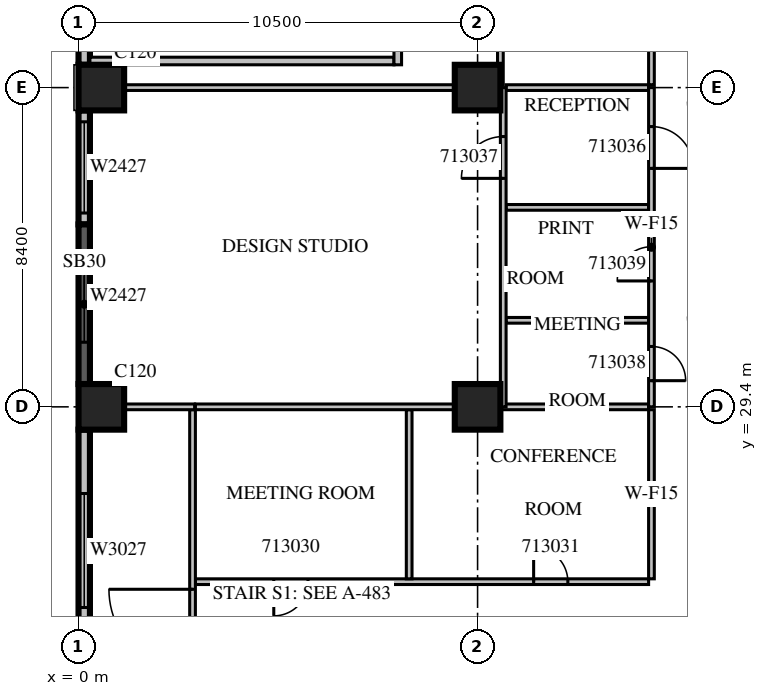
"""IFC4 building model, lengths in metres.
Left out: names, types, materials, properties, quantities, classifications, styles, units other than length and angle.
Written with IfcOpenShell. Run it as: python <this file> out.ifc"""

import sys

from ifc_helpers import new_model, si_unit, direction, frame, frame_2d, origin, origin_2d, place, context, subcontext, project, spatial, rectangle, extrude, source, transform, mapped, element, fill, save


model = new_model("IFC4")
c1 = context("Model", 3, precision=1e-05, world=origin(), true_north=direction((0.0, 1.0)))
c2 = subcontext(c1, "Body", "Model", "MODEL_VIEW")
j1 = project(units=[si_unit("LENGTHUNIT", "METRE"), si_unit("PLANEANGLEUNIT", "RADIAN")], contexts=[c1])
p1 = place(None, origin())
s1 = spatial("IfcSite", under=j1, at=p1, CompositionType="ELEMENT")
p2 = place(p1, origin())
s2 = spatial("IfcBuilding", under=s1, at=p2, CompositionType="ELEMENT")
p3 = place(p2, frame((0.0, 0.0, 65.7)))
s3 = spatial("IfcBuildingStorey", under=s2, at=p3, CompositionType="ELEMENT", Elevation=65.7)
m1 = source(origin(), c2, "Body", "SweptSolid", [
    extrude(rectangle(XDim=1.2, YDim=1.2, at=origin_2d()), origin(), (0.0, 0.0, 1.0), 4.2),
])
for number, where, z_axis, x_axis in (
    (1, (0.6, 29.4, 0.0), (0.0, 0.0, 1.0), (1.0, 0.0, 0.0)),
    (2, (10.5, 29.4, 0.0), (0.0, 0.0, 1.0), (1.0, 0.0, 0.0)),
    (3, (0.6, 37.8, 0.0), (0.0, 0.0, 1.0), (1.0, 0.0, 0.0)),
    (4, (10.5, 37.8, 0.0), (0.0, 0.0, 1.0), (1.0, 0.0, 0.0)),
):
    element("IfcColumn", number, at=place(p3, frame(where, z_axis=z_axis, x_axis=x_axis)), inside=s3, PredefinedType="COLUMN", context=c2, shape_type="MappedRepresentation", body=[
        mapped(m1, transform((0.0, 0.0, 0.0), scale=1.0)),
    ])
m2 = source(origin(), c2, "Body", "SweptSolid", [
    extrude(rectangle(XDim=1.8, YDim=0.3, at=frame_2d((0.9, 0.0))), origin(), (0.0, 0.0, 1.0), 3.8),
])
p4 = place(p3, frame((0.15, 40.2, 0.0), z_axis=(0.0, 0.0, 1.0), x_axis=(0.0, -1.0, 0.0)))
e5 = element("IfcWall", 5, at=p4, inside=s3, PredefinedType="STANDARD", context=c2, shape_type="MappedRepresentation", body=[
    mapped(m2, transform((0.0, 0.0, 0.0), scale=1.0)),
])
m3 = source(origin(), c2, "Body", "SweptSolid", [
    extrude(rectangle(XDim=3.0, YDim=0.3, at=frame_2d((1.5, 0.0))), origin(), (0.0, 0.0, 1.0), 3.8),
])
p5 = place(p3, frame((0.15, 37.2, 0.0), z_axis=(0.0, 0.0, 1.0), x_axis=(0.0, -1.0, 0.0)))
e6 = element("IfcWall", 6, at=p5, inside=s3, PredefinedType="STANDARD", context=c2, shape_type="MappedRepresentation", body=[
    mapped(m3, transform((0.0, 0.0, 0.0), scale=1.0)),
])
m4 = source(origin(), c2, "Body", "SweptSolid", [
    extrude(rectangle(XDim=2.4, YDim=2.7, at=frame_2d((1.2, 1.35))), frame((0.0, 0.16, 0.0), z_axis=(0.0, -1.0, 0.0), x_axis=(1.0, 0.0, 0.0)), (0.0, 0.0, 1.0), 0.32),
])
p6 = place(p5, frame((0.3, 0.0, 0.6)))
e7 = element("IfcOpeningElement", 7, at=p6, cuts=e6, PredefinedType="OPENING", context=c2, shape_type="MappedRepresentation", body=[
    mapped(m4, transform((0.0, 0.0, 0.0), scale=1.0)),
])
m5 = source(origin(), c2, "Body", "SweptSolid", [
    extrude(rectangle(XDim=4.2, YDim=0.3, at=frame_2d((2.1, 0.0))), origin(), (0.0, 0.0, 1.0), 3.8),
])
p7 = place(p3, frame((0.15, 34.2, 0.0), z_axis=(0.0, 0.0, 1.0), x_axis=(0.0, -1.0, 0.0)))
e8 = element("IfcWall", 8, at=p7, inside=s3, PredefinedType="SOLIDWALL", context=c2, shape_type="MappedRepresentation", body=[
    mapped(m5, transform((0.0, 0.0, 0.0), scale=1.0)),
])
p8 = place(p7, frame((0.7, 0.0, 0.6)))
e9 = element("IfcOpeningElement", 9, at=p8, cuts=e8, PredefinedType="OPENING", context=c2, shape_type="MappedRepresentation", body=[
    mapped(m4, transform((0.0, 0.0, 0.0), scale=1.0)),
])
m6 = source(origin(), c2, "Body", "SweptSolid", [
    extrude(rectangle(XDim=7.2, YDim=0.3, at=frame_2d((3.6, 0.0))), origin(), (0.0, 0.0, 1.0), 3.8),
])
p9 = place(p3, frame((0.15, 28.8, 0.0), z_axis=(0.0, 0.0, 1.0), x_axis=(0.0, -1.0, 0.0)))
e10 = element("IfcWall", 10, at=p9, inside=s3, PredefinedType="STANDARD", context=c2, shape_type="MappedRepresentation", body=[
    mapped(m6, transform((0.0, 0.0, 0.0), scale=1.0)),
])
m7 = source(origin(), c2, "Body", "SweptSolid", [
    extrude(rectangle(XDim=3.0, YDim=2.7, at=frame_2d((1.5, 1.35))), frame((0.0, 0.16, 0.0), z_axis=(0.0, -1.0, 0.0), x_axis=(1.0, 0.0, 0.0)), (0.0, 0.0, 1.0), 0.32),
])
p10 = place(p9, frame((1.68, 0.0, 0.6)))
e11 = element("IfcOpeningElement", 11, at=p10, cuts=e10, PredefinedType="OPENING", context=c2, shape_type="MappedRepresentation", body=[
    mapped(m7, transform((0.0, 0.0, 0.0), scale=1.0)),
])
m8 = source(origin(), c2, "Body", "SweptSolid", [
    extrude(rectangle(XDim=8.0, YDim=0.2, at=frame_2d((4.0, 0.0))), origin(), (0.0, 0.0, 1.0), 3.8),
])
p11 = place(p3, frame((0.3, 38.5, 0.0), z_axis=(0.0, 0.0, 1.0), x_axis=(1.0, 0.0, 0.0)))
e12 = element("IfcWall", 12, at=p11, inside=s3, PredefinedType="PARTITIONING", context=c2, shape_type="MappedRepresentation", body=[
    mapped(m8, transform((0.0, 0.0, 0.0), scale=1.0)),
])
m9 = source(origin(), c2, "Body", "SweptSolid", [
    extrude(rectangle(XDim=5.45, YDim=0.2, at=frame_2d((2.725, 0.0))), origin(), (0.0, 0.0, 1.0), 3.8),
])
p12 = place(p3, frame((8.4, 38.4, 0.0), z_axis=(0.0, 0.0, 1.0), x_axis=(0.0, 1.0, 0.0)))
e13 = element("IfcWall", 13, at=p12, inside=s3, PredefinedType="PARTITIONING", context=c2, shape_type="MappedRepresentation", body=[
    mapped(m9, transform((0.0, 0.0, 0.0), scale=1.0)),
])
m10 = source(origin(), c2, "Body", "SweptSolid", [
    extrude(rectangle(XDim=1.2, YDim=2.1, at=frame_2d((0.6, 1.05))), frame((0.0, 0.11, 0.0), z_axis=(0.0, -1.0, 0.0), x_axis=(1.0, 0.0, 0.0)), (0.0, 0.0, 1.0), 0.22),
])
p13 = place(p12, frame((0.4, 0.0, 0.0)))
e14 = element("IfcOpeningElement", 14, at=p13, cuts=e13, PredefinedType="OPENING", context=c2, shape_type="MappedRepresentation", body=[
    mapped(m10, transform((0.0, 0.0, 0.0), scale=1.0)),
])
m11 = source(origin(), c2, "Body", "SweptSolid", [
    extrude(rectangle(XDim=0.9, YDim=2.1, at=frame_2d((0.45, 1.05))), frame((0.0, 0.11, 0.0), z_axis=(0.0, -1.0, 0.0), x_axis=(1.0, 0.0, 0.0)), (0.0, 0.0, 1.0), 0.22),
])
p14 = place(p12, frame((3.25, 0.0, 0.0)))
e15 = element("IfcOpeningElement", 15, at=p14, cuts=e13, PredefinedType="OPENING", context=c2, shape_type="MappedRepresentation", body=[
    mapped(m11, transform((0.0, 0.0, 0.0), scale=1.0)),
])
m12 = source(origin(), c2, "Body", "SweptSolid", [
    extrude(rectangle(XDim=11.925, YDim=0.15, at=frame_2d((5.963, 0.0))), origin(), (0.0, 0.0, 1.0), 3.8),
])
p15 = place(p3, frame((3.075, 24.8, 0.0), z_axis=(0.0, 0.0, 1.0), x_axis=(1.0, 0.0, 0.0)))
e16 = element("IfcWall", 16, at=p15, inside=s3, PredefinedType="PARTITIONING", context=c2, shape_type="MappedRepresentation", body=[
    mapped(m12, transform((0.0, 0.0, 0.0), scale=1.0)),
])
m13 = source(origin(), c2, "Body", "SweptSolid", [
    extrude(rectangle(XDim=0.9, YDim=2.1, at=frame_2d((0.45, 1.05))), frame((0.0, 0.085, 0.0), z_axis=(0.0, -1.0, 0.0), x_axis=(1.0, 0.0, 0.0)), (0.0, 0.0, 1.0), 0.17),
])
p16 = place(p15, frame((2.062, 0.0, 0.0)))
e17 = element("IfcOpeningElement", 17, at=p16, cuts=e16, PredefinedType="OPENING", context=c2, shape_type="MappedRepresentation", body=[
    mapped(m13, transform((0.0, 0.0, 0.0), scale=1.0)),
])
p17 = place(p15, frame((8.9, 0.0, 0.0)))
e18 = element("IfcOpeningElement", 18, at=p17, cuts=e16, PredefinedType="OPENING", context=c2, shape_type="MappedRepresentation", body=[
    mapped(m13, transform((0.0, 0.0, 0.0), scale=1.0)),
])
m14 = source(origin(), c2, "Body", "SweptSolid", [
    extrude(rectangle(XDim=4.45, YDim=0.15, at=frame_2d((2.225, 0.0))), origin(), (0.0, 0.0, 1.0), 3.8),
])
for number, where, z_axis, x_axis in (
    (19, (8.7, 24.875, 0.0), (0.0, 0.0, 1.0), (0.0, 1.0, 0.0)),
    (20, (15.075, 24.875, 0.0), (0.0, 0.0, 1.0), (0.0, 1.0, 0.0)),
):
    element("IfcWall", number, at=place(p3, frame(where, z_axis=z_axis, x_axis=x_axis)), inside=s3, PredefinedType="PARTITIONING", context=c2, shape_type="MappedRepresentation", body=[
        mapped(m14, transform((0.0, 0.0, 0.0), scale=1.0)),
    ])
m15 = source(origin(), c2, "Body", "SweptSolid", [
    extrude(rectangle(XDim=6.826, YDim=0.15, at=frame_2d((3.413, 0.0))), origin(), (0.0, 0.0, 1.0), 3.8),
])
p18 = place(p3, frame((9.901, 29.4, 0.0), z_axis=(0.0, 0.0, 1.0), x_axis=(-1.0, 0.0, 0.0)))
e21 = element("IfcWall", 21, at=p18, inside=s3, PredefinedType="PARTITIONING", context=c2, shape_type="MappedRepresentation", body=[
    mapped(m15, transform((0.0, 0.0, 0.0), scale=1.0)),
])
m16 = source(origin(), c2, "Body", "SweptSolid", [
    extrude(rectangle(XDim=3.901, YDim=0.15, at=frame_2d((1.95, 0.0))), origin(), (0.0, 0.0, 1.0), 3.8),
])
p19 = place(p3, frame((15.0, 29.4, 0.0), z_axis=(0.0, 0.0, 1.0), x_axis=(-1.0, 0.0, 0.0)))
e22 = element("IfcWall", 22, at=p19, inside=s3, PredefinedType="PARTITIONING", context=c2, shape_type="MappedRepresentation", body=[
    mapped(m16, transform((0.0, 0.0, 0.0), scale=1.0)),
])
m17 = source(origin(), c2, "Body", "SweptSolid", [
    extrude(rectangle(XDim=7.125, YDim=0.15, at=frame_2d((3.562, 0.0))), origin(), (0.0, 0.0, 1.0), 3.8),
])
p20 = place(p3, frame((3.0, 29.325, 0.0), z_axis=(0.0, 0.0, 1.0), x_axis=(0.0, -1.0, 0.0)))
e23 = element("IfcWall", 23, at=p20, inside=s3, PredefinedType="PARTITIONING", context=c2, shape_type="MappedRepresentation", body=[
    mapped(m17, transform((0.0, 0.0, 0.0), scale=1.0)),
])
p21 = place(p20, frame((4.725, 0.0, 0.0)))
e24 = element("IfcOpeningElement", 24, at=p21, cuts=e23, PredefinedType="OPENING", context=c2, shape_type="SweptSolid", body=[
    extrude(rectangle(XDim=2.2, YDim=2.1, at=frame_2d((1.1, 1.05))), frame((0.0, 0.085, 0.0), z_axis=(0.0, -1.0, 0.0), x_axis=(1.0, 0.0, 0.0)), (0.0, 0.0, 1.0), 0.17),
])
m18 = source(origin(), c2, "Body", "SweptSolid", [
    extrude(rectangle(XDim=6.45, YDim=0.15, at=frame_2d((3.225, 0.0))), origin(), (0.0, 0.0, 1.0), 3.8),
])
p22 = place(p3, frame((11.1, 44.325, 0.0), z_axis=(0.0, 0.0, 1.0), x_axis=(0.0, -1.0, 0.0)))
e25 = element("IfcWall", 25, at=p22, inside=s3, PredefinedType="PARTITIONING", context=c2, shape_type="MappedRepresentation", body=[
    mapped(m18, transform((0.0, 0.0, 0.0), scale=1.0)),
])
p23 = place(p3, frame((15.075, 37.875, 0.0), z_axis=(0.0, 0.0, 1.0), x_axis=(0.0, 1.0, 0.0)))
e26 = element("IfcWall", 26, at=p23, inside=s3, PredefinedType="PARTITIONING", context=c2, shape_type="MappedRepresentation", body=[
    mapped(m18, transform((0.0, 0.0, 0.0), scale=1.0)),
])
p24 = place(p23, frame((2.737, 0.0, 0.0)))
e27 = element("IfcOpeningElement", 27, at=p24, cuts=e26, PredefinedType="OPENING", context=c2, shape_type="MappedRepresentation", body=[
    mapped(m13, transform((0.0, 0.0, 0.0), scale=1.0)),
])
m19 = source(origin(), c2, "Body", "SweptSolid", [
    extrude(rectangle(XDim=3.75, YDim=0.15, at=frame_2d((1.875, 0.0))), origin(), (0.0, 0.0, 1.0), 3.8),
])
for number, where, z_axis, x_axis in (
    (28, (15.0, 31.677, 0.0), (0.0, 0.0, 1.0), (-1.0, 0.0, 0.0)),
    (29, (15.0, 34.648, 0.0), (0.0, 0.0, 1.0), (-1.0, 0.0, 0.0)),
):
    element("IfcWall", number, at=place(p3, frame(where, z_axis=z_axis, x_axis=x_axis)), inside=s3, PredefinedType="PARTITIONING", context=c2, shape_type="MappedRepresentation", body=[
        mapped(m19, transform((0.0, 0.0, 0.0), scale=1.0)),
    ])
m20 = source(origin(), c2, "Body", "SweptSolid", [
    extrude(rectangle(XDim=1.856, YDim=0.15, at=frame_2d((0.928, 0.0))), origin(), (0.0, 0.0, 1.0), 3.8),
])
p25 = place(p3, frame((3.055, 29.4, 0.0), z_axis=(0.0, 0.0, 1.0), x_axis=(-1.0, 0.0, 0.0)))
e30 = element("IfcWall", 30, at=p25, inside=s3, PredefinedType="PARTITIONING", context=c2, shape_type="MappedRepresentation", body=[
    mapped(m20, transform((0.0, 0.0, 0.0), scale=1.0)),
])
m21 = source(origin(), c2, "Body", "SweptSolid", [
    extrude(rectangle(XDim=8.702, YDim=0.15, at=frame_2d((4.351, 0.0))), origin(), (0.0, 0.0, 1.0), 3.8),
])
p26 = place(p3, frame((9.901, 37.8, 0.0), z_axis=(0.0, 0.0, 1.0), x_axis=(-1.0, 0.0, 0.0)))
e31 = element("IfcWall", 31, at=p26, inside=s3, PredefinedType="PARTITIONING", context=c2, shape_type="MappedRepresentation", body=[
    mapped(m21, transform((0.0, 0.0, 0.0), scale=1.0)),
])
p27 = place(p3, frame((15.0, 37.8, 0.0), z_axis=(0.0, 0.0, 1.0), x_axis=(-1.0, 0.0, 0.0)))
e32 = element("IfcWall", 32, at=p27, inside=s3, PredefinedType="PARTITIONING", context=c2, shape_type="MappedRepresentation", body=[
    mapped(m19, transform((0.0, 0.0, 0.0), scale=1.0)),
])
m22 = source(origin(), c2, "Body", "SweptSolid", [
    extrude(rectangle(XDim=8.4, YDim=0.15, at=frame_2d((4.2, 0.0))), origin(), (0.0, 0.0, 1.0), 3.8),
])
p28 = place(p3, frame((11.175, 29.4, 0.0), z_axis=(0.0, 0.0, 1.0), x_axis=(0.0, 1.0, 0.0)))
e33 = element("IfcWall", 33, at=p28, inside=s3, PredefinedType="PARTITIONING", context=c2, shape_type="MappedRepresentation", body=[
    mapped(m22, transform((0.0, 0.0, 0.0), scale=1.0)),
])
m23 = source(origin(), c2, "Body", "SweptSolid", [
    extrude(rectangle(XDim=1.1, YDim=2.1, at=frame_2d((0.55, 1.05))), frame((0.0, 0.085, 0.0), z_axis=(0.0, -1.0, 0.0), x_axis=(1.0, 0.0, 0.0)), (0.0, 0.0, 1.0), 0.17),
])
p29 = place(p28, frame((6.012, 0.0, 0.0)))
e34 = element("IfcOpeningElement", 34, at=p29, cuts=e33, PredefinedType="OPENING", context=c2, shape_type="MappedRepresentation", body=[
    mapped(m23, transform((0.0, 0.0, 0.0), scale=1.0)),
])
p30 = place(p3, frame((15.075, 29.4, 0.0), z_axis=(0.0, 0.0, 1.0), x_axis=(0.0, 1.0, 0.0)))
e35 = element("IfcWall", 35, at=p30, inside=s3, PredefinedType="PARTITIONING", context=c2, shape_type="MappedRepresentation", body=[
    mapped(m22, transform((0.0, 0.0, 0.0), scale=1.0)),
])
p31 = place(p30, frame((6.274, 0.0, 0.0)))
e36 = element("IfcOpeningElement", 36, at=p31, cuts=e35, PredefinedType="OPENING", context=c2, shape_type="MappedRepresentation", body=[
    mapped(m23, transform((0.0, 0.0, 0.0), scale=1.0)),
])
p32 = place(p30, frame((0.689, 0.0, 0.0)))
e37 = element("IfcOpeningElement", 37, at=p32, cuts=e35, PredefinedType="OPENING", context=c2, shape_type="MappedRepresentation", body=[
    mapped(m13, transform((0.0, 0.0, 0.0), scale=1.0)),
])
p33 = place(p30, frame((3.313, 0.0, 0.0)))
e38 = element("IfcOpeningElement", 38, at=p33, cuts=e35, PredefinedType="OPENING", context=c2, shape_type="MappedRepresentation", body=[
    mapped(m13, transform((0.0, 0.0, 0.0), scale=1.0)),
])
m24 = source(origin(), c2, "Body", "SweptSolid", [
    extrude(rectangle(XDim=3.0, YDim=2.7, at=frame_2d((1.5, 1.35))), frame((0.0, 0.03, 0.0), z_axis=(0.0, -1.0, 0.0), x_axis=(1.0, 0.0, 0.0)), (0.0, 0.0, 1.0), 0.06),
])
p34 = place(p10, origin())
e39 = element("IfcWindow", 39, at=p34, inside=s3, PartitioningType="SINGLE_PANEL", PredefinedType="WINDOW", context=c2, shape_type="MappedRepresentation", body=[
    mapped(m24, transform((0.0, 0.0, 0.0), scale=1.0)),
])
fill(e11, e39)
m25 = source(origin(), c2, "Body", "SweptSolid", [
    extrude(rectangle(XDim=2.4, YDim=2.7, at=frame_2d((1.2, 1.35))), frame((0.0, 0.03, 0.0), z_axis=(0.0, -1.0, 0.0), x_axis=(1.0, 0.0, 0.0)), (0.0, 0.0, 1.0), 0.06),
])
p35 = place(p6, origin())
e40 = element("IfcWindow", 40, at=p35, inside=s3, PartitioningType="SINGLE_PANEL", PredefinedType="WINDOW", context=c2, shape_type="MappedRepresentation", body=[
    mapped(m25, transform((0.0, 0.0, 0.0), scale=1.0)),
])
fill(e7, e40)
p36 = place(p8, origin())
e41 = element("IfcWindow", 41, at=p36, inside=s3, PartitioningType="SINGLE_PANEL", PredefinedType="WINDOW", context=c2, shape_type="MappedRepresentation", body=[
    mapped(m25, transform((0.0, 0.0, 0.0), scale=1.0)),
])
fill(e9, e41)
m26 = source(origin(), c2, "Body", "SweptSolid", [
    extrude(rectangle(XDim=0.9, YDim=2.1, at=frame_2d((0.45, 1.05))), frame((0.0, 0.025, 0.0), z_axis=(0.0, -1.0, 0.0), x_axis=(1.0, 0.0, 0.0)), (0.0, 0.0, 1.0), 0.05),
])
p37 = place(p16, origin())
e42 = element("IfcDoor", 42, at=p37, inside=s3, OperationType="SINGLE_SWING_RIGHT", PredefinedType="DOOR", context=c2, shape_type="MappedRepresentation", body=[
    mapped(m26, transform((0.0, 0.0, 0.0), scale=1.0)),
])
fill(e17, e42)
p38 = place(p17, origin())
e43 = element("IfcDoor", 43, at=p38, inside=s3, OperationType="SINGLE_SWING_LEFT", PredefinedType="DOOR", context=c2, shape_type="MappedRepresentation", body=[
    mapped(m26, transform((0.0, 0.0, 0.0), scale=1.0)),
])
fill(e18, e43)
m27 = source(origin(), c2, "Body", "SweptSolid", [
    extrude(rectangle(XDim=2.2, YDim=2.1, at=frame_2d((1.1, 1.05))), frame((0.0, 0.025, 0.0), z_axis=(0.0, -1.0, 0.0), x_axis=(1.0, 0.0, 0.0)), (0.0, 0.0, 1.0), 0.05),
])
p39 = place(p21, origin())
e44 = element("IfcDoor", 44, at=p39, inside=s3, OperationType="DOUBLE_DOOR_SINGLE_SWING", PredefinedType="DOOR", context=c2, shape_type="MappedRepresentation", body=[
    mapped(m27, transform((0.0, 0.0, 0.0), scale=1.0)),
])
fill(e24, e44)
m28 = source(origin(), c2, "Body", "SweptSolid", [
    extrude(rectangle(XDim=1.1, YDim=2.1, at=frame_2d((0.55, 1.05))), frame((0.0, 0.025, 0.0), z_axis=(0.0, -1.0, 0.0), x_axis=(1.0, 0.0, 0.0)), (0.0, 0.0, 1.0), 0.05),
])
p40 = place(p31, origin())
e45 = element("IfcDoor", 45, at=p40, inside=s3, OperationType="SINGLE_SWING_RIGHT", PredefinedType="DOOR", context=c2, shape_type="MappedRepresentation", body=[
    mapped(m28, transform((0.0, 0.0, 0.0), scale=1.0)),
])
fill(e36, e45)
p41 = place(p29, origin())
e46 = element("IfcDoor", 46, at=p41, inside=s3, OperationType="SINGLE_SWING_LEFT", PredefinedType="DOOR", context=c2, shape_type="MappedRepresentation", body=[
    mapped(m28, transform((0.0, 0.0, 0.0), scale=1.0)),
])
fill(e34, e46)
p42 = place(p32, origin())
e47 = element("IfcDoor", 47, at=p42, inside=s3, OperationType="SINGLE_SWING_RIGHT", PredefinedType="DOOR", context=c2, shape_type="MappedRepresentation", body=[
    mapped(m26, transform((0.0, 0.0, 0.0), scale=1.0)),
])
fill(e37, e47)
p43 = place(p33, origin())
e48 = element("IfcDoor", 48, at=p43, inside=s3, OperationType="SINGLE_SWING_LEFT", PredefinedType="DOOR", context=c2, shape_type="MappedRepresentation", body=[
    mapped(m26, transform((0.0, 0.0, 0.0), scale=1.0)),
])
fill(e38, e48)
save(model, sys.argv[1])
